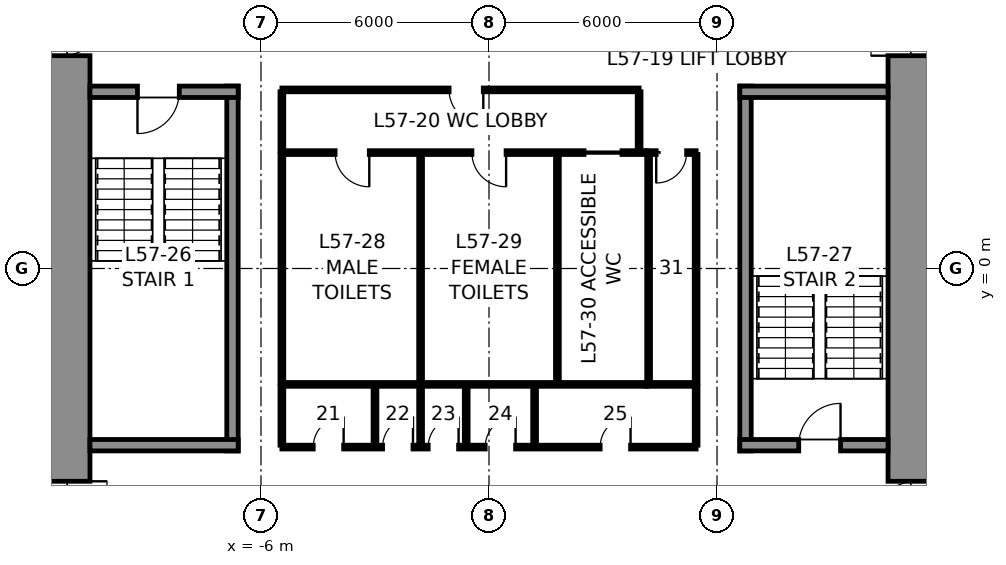
"""IFC4 building model, lengths in metres.
Left out: names, types, materials, properties, quantities, classifications, styles, units other than length and angle.
Written with IfcOpenShell. Run it as: python <this file> out.ifc"""

import sys

from ifc_helpers import new_model, si_unit, direction, frame, frame_2d, origin, place, context, subcontext, project, spatial, rectangle, extrude, element, fill, save


model = new_model("IFC4")
c1 = context("Model", 3, precision=1e-05, world=origin(), true_north=direction((0.0, 1.0)))
c2 = subcontext(c1, "Body", "Model", "MODEL_VIEW")
j1 = project(units=[si_unit("LENGTHUNIT", "METRE"), si_unit("PLANEANGLEUNIT", "RADIAN")], contexts=[c1])
p1 = place(None, origin())
s1 = spatial("IfcSite", under=j1, at=p1, CompositionType="ELEMENT")
p2 = place(p1, origin())
s2 = spatial("IfcBuilding", under=s1, at=p2, CompositionType="ELEMENT")
p3 = place(p2, frame((0.0, 0.0, 257.8)))
s3 = spatial("IfcBuildingStorey", under=s2, at=p3, CompositionType="ELEMENT", Elevation=257.8)
p4 = place(p3, frame((11.25, 10.5, 0.0), z_axis=(0.0, 0.0, 1.0), x_axis=(0.0, -1.0, 0.0)))
e1 = element("IfcWall", 1, at=p4, inside=s3, PredefinedType="SHEAR", context=c2, shape_type="SweptSolid", body=[
    extrude(rectangle(XDim=21.0, YDim=1.5, at=frame_2d((10.5, 0.0))), origin(), (0.0, 0.0, 1.0), 4.0),
])
p5 = place(p4, frame((3.7, 0.0, 0.0)))
e2 = element("IfcOpeningElement", 2, at=p5, cuts=e1, PredefinedType="OPENING", context=c2, shape_type="SweptSolid", body=[
    extrude(rectangle(XDim=1.2, YDim=2.3, at=frame_2d((0.6, 1.15))), frame((0.0, 0.76, 0.0), z_axis=(0.0, -1.0, 0.0), x_axis=(1.0, 0.0, 0.0)), (0.0, 0.0, 1.0), 1.52),
])
p6 = place(p4, frame((16.1, 0.0, 0.0)))
e3 = element("IfcOpeningElement", 3, at=p6, cuts=e1, PredefinedType="OPENING", context=c2, shape_type="SweptSolid", body=[
    extrude(rectangle(XDim=1.2, YDim=2.3, at=frame_2d((0.6, 1.15))), frame((0.0, 0.76, 0.0), z_axis=(0.0, -1.0, 0.0), x_axis=(1.0, 0.0, 0.0)), (0.0, 0.0, 1.0), 1.52),
])
p7 = place(p3, frame((-11.25, -10.5, 0.0), z_axis=(0.0, 0.0, 1.0), x_axis=(0.0, 1.0, 0.0)))
e4 = element("IfcWall", 4, at=p7, inside=s3, PredefinedType="SHEAR", context=c2, shape_type="SweptSolid", body=[
    extrude(rectangle(XDim=21.0, YDim=1.5, at=frame_2d((10.5, 0.0))), origin(), (0.0, 0.0, 1.0), 4.0),
])
p8 = place(p7, frame((16.1, 0.0, 0.0)))
e5 = element("IfcOpeningElement", 5, at=p8, cuts=e4, PredefinedType="OPENING", context=c2, shape_type="SweptSolid", body=[
    extrude(rectangle(XDim=1.2, YDim=2.3, at=frame_2d((0.6, 1.15))), frame((0.0, 0.76, 0.0), z_axis=(0.0, -1.0, 0.0), x_axis=(1.0, 0.0, 0.0)), (0.0, 0.0, 1.0), 1.52),
])
p9 = place(p7, frame((3.7, 0.0, 0.0)))
e6 = element("IfcOpeningElement", 6, at=p9, cuts=e4, PredefinedType="OPENING", context=c2, shape_type="SweptSolid", body=[
    extrude(rectangle(XDim=1.2, YDim=2.3, at=frame_2d((0.6, 1.15))), frame((0.0, 0.76, 0.0), z_axis=(0.0, -1.0, 0.0), x_axis=(1.0, 0.0, 0.0)), (0.0, 0.0, 1.0), 1.52),
])
p10 = place(p3, frame((-6.75, -4.8, 0.0), z_axis=(0.0, 0.0, 1.0), x_axis=(0.0, 1.0, 0.0)))
e7 = element("IfcWall", 7, at=p10, inside=s3, PredefinedType="SOLIDWALL", context=c2, shape_type="SweptSolid", body=[
    extrude(rectangle(XDim=9.6, YDim=0.3, at=frame_2d((4.8, 0.0))), origin(), (0.0, 0.0, 1.0), 3.75),
])
p11 = place(p3, frame((-10.5, 4.65, 0.0), z_axis=(0.0, 0.0, 1.0), x_axis=(1.0, 0.0, 0.0)))
e8 = element("IfcWall", 8, at=p11, inside=s3, PredefinedType="SOLIDWALL", context=c2, shape_type="SweptSolid", body=[
    extrude(rectangle(XDim=3.9, YDim=0.3, at=frame_2d((1.95, 0.0))), origin(), (0.0, 0.0, 1.0), 3.75),
])
p12 = place(p11, frame((1.25, 0.0, 0.0)))
e9 = element("IfcOpeningElement", 9, at=p12, cuts=e8, PredefinedType="OPENING", context=c2, shape_type="SweptSolid", body=[
    extrude(rectangle(XDim=1.1, YDim=2.3, at=frame_2d((0.55, 1.15))), frame((0.0, 0.16, 0.0), z_axis=(0.0, -1.0, 0.0), x_axis=(1.0, 0.0, 0.0)), (0.0, 0.0, 1.0), 0.32),
])
p13 = place(p3, frame((-6.6, -4.65, 0.0), z_axis=(0.0, 0.0, 1.0), x_axis=(-1.0, 0.0, 0.0)))
e10 = element("IfcWall", 10, at=p13, inside=s3, PredefinedType="SOLIDWALL", context=c2, shape_type="SweptSolid", body=[
    extrude(rectangle(XDim=3.9, YDim=0.3, at=frame_2d((1.95, 0.0))), origin(), (0.0, 0.0, 1.0), 3.75),
])
p14 = place(p3, frame((6.75, -4.8, 0.0), z_axis=(0.0, 0.0, 1.0), x_axis=(0.0, 1.0, 0.0)))
e11 = element("IfcWall", 11, at=p14, inside=s3, PredefinedType="SOLIDWALL", context=c2, shape_type="SweptSolid", body=[
    extrude(rectangle(XDim=9.6, YDim=0.3, at=frame_2d((4.8, 0.0))), origin(), (0.0, 0.0, 1.0), 3.75),
])
p15 = place(p3, frame((6.6, 4.65, 0.0), z_axis=(0.0, 0.0, 1.0), x_axis=(1.0, 0.0, 0.0)))
e12 = element("IfcWall", 12, at=p15, inside=s3, PredefinedType="SOLIDWALL", context=c2, shape_type="SweptSolid", body=[
    extrude(rectangle(XDim=3.9, YDim=0.3, at=frame_2d((1.95, 0.0))), origin(), (0.0, 0.0, 1.0), 3.75),
])
p16 = place(p3, frame((10.5, -4.65, 0.0), z_axis=(0.0, 0.0, 1.0), x_axis=(-1.0, 0.0, 0.0)))
e13 = element("IfcWall", 13, at=p16, inside=s3, PredefinedType="SOLIDWALL", context=c2, shape_type="SweptSolid", body=[
    extrude(rectangle(XDim=3.9, YDim=0.3, at=frame_2d((1.95, 0.0))), origin(), (0.0, 0.0, 1.0), 3.75),
])
p17 = place(p16, frame((1.25, 0.0, 0.0)))
e14 = element("IfcOpeningElement", 14, at=p17, cuts=e13, PredefinedType="OPENING", context=c2, shape_type="SweptSolid", body=[
    extrude(rectangle(XDim=1.1, YDim=2.3, at=frame_2d((0.55, 1.15))), frame((0.0, 0.16, 0.0), z_axis=(0.0, -1.0, 0.0), x_axis=(1.0, 0.0, 0.0)), (0.0, 0.0, 1.0), 0.32),
])
p18 = place(p3, frame((-5.45, 3.05, 0.0), z_axis=(0.0, 0.0, 1.0), x_axis=(1.0, 0.0, 0.0)))
e15 = element("IfcWall", 15, at=p18, inside=s3, PredefinedType="PARTITIONING", context=c2, shape_type="SweptSolid", body=[
    extrude(rectangle(XDim=9.6, YDim=0.1, at=frame_2d((4.8, 0.0))), origin(), (0.0, 0.0, 1.0), 3.75),
])
p19 = place(p18, frame((1.4, 0.0, 0.0)))
e16 = element("IfcOpeningElement", 16, at=p19, cuts=e15, PredefinedType="OPENING", context=c2, shape_type="SweptSolid", body=[
    extrude(rectangle(XDim=0.9, YDim=2.3, at=frame_2d((0.45, 1.15))), frame((0.0, 0.06, 0.0), z_axis=(0.0, -1.0, 0.0), x_axis=(1.0, 0.0, 0.0)), (0.0, 0.0, 1.0), 0.12),
])
p20 = place(p18, frame((5.0, 0.0, 0.0)))
e17 = element("IfcOpeningElement", 17, at=p20, cuts=e15, PredefinedType="OPENING", context=c2, shape_type="SweptSolid", body=[
    extrude(rectangle(XDim=0.9, YDim=2.3, at=frame_2d((0.45, 1.15))), frame((0.0, 0.06, 0.0), z_axis=(0.0, -1.0, 0.0), x_axis=(1.0, 0.0, 0.0)), (0.0, 0.0, 1.0), 0.12),
])
p21 = place(p18, frame((7.95, 0.0, 0.0)))
e18 = element("IfcOpeningElement", 18, at=p21, cuts=e15, PredefinedType="OPENING", context=c2, shape_type="SweptSolid", body=[
    extrude(rectangle(XDim=1.0, YDim=2.3, at=frame_2d((0.5, 1.15))), frame((0.0, 0.06, 0.0), z_axis=(0.0, -1.0, 0.0), x_axis=(1.0, 0.0, 0.0)), (0.0, 0.0, 1.0), 0.12),
])
p22 = place(p3, frame((4.15, 3.05, 0.0), z_axis=(0.0, 0.0, 1.0), x_axis=(1.0, 0.0, 0.0)))
e19 = element("IfcWall", 19, at=p22, inside=s3, PredefinedType="PARTITIONING", context=c2, shape_type="SweptSolid", body=[
    extrude(rectangle(XDim=1.3, YDim=0.1, at=frame_2d((0.65, 0.0))), origin(), (0.0, 0.0, 1.0), 3.75),
])
p23 = place(p22, frame((0.25, 0.0, 0.0)))
e20 = element("IfcOpeningElement", 20, at=p23, cuts=e19, PredefinedType="OPENING", context=c2, shape_type="SweptSolid", body=[
    extrude(rectangle(XDim=0.8, YDim=2.3, at=frame_2d((0.4, 1.15))), frame((0.0, 0.06, 0.0), z_axis=(0.0, -1.0, 0.0), x_axis=(1.0, 0.0, 0.0)), (0.0, 0.0, 1.0), 0.12),
])
p24 = place(p3, frame((4.15, -3.05, 0.0), z_axis=(0.0, 0.0, 1.0), x_axis=(-1.0, 0.0, 0.0)))
e21 = element("IfcWall", 21, at=p24, inside=s3, PredefinedType="PARTITIONING", context=c2, shape_type="SweptSolid", body=[
    extrude(rectangle(XDim=9.6, YDim=0.1, at=frame_2d((4.8, 0.0))), origin(), (0.0, 0.0, 1.0), 3.75),
])
p25 = place(p3, frame((5.45, -3.05, 0.0), z_axis=(0.0, 0.0, 1.0), x_axis=(-1.0, 0.0, 0.0)))
e22 = element("IfcWall", 22, at=p25, inside=s3, PredefinedType="PARTITIONING", context=c2, shape_type="SweptSolid", body=[
    extrude(rectangle(XDim=1.3, YDim=0.1, at=frame_2d((0.65, 0.0))), origin(), (0.0, 0.0, 1.0), 3.75),
])
for number, where, z_axis, x_axis in (
    (23, (5.45, 3.0, 0.0), (0.0, 0.0, 1.0), (0.0, -1.0, 0.0)),
    (24, (-5.45, -3.0, 0.0), (0.0, 0.0, 1.0), (0.0, 1.0, 0.0)),
    (25, (-1.8, -3.0, 0.0), (0.0, 0.0, 1.0), (0.0, 1.0, 0.0)),
    (26, (1.8, -3.0, 0.0), (0.0, 0.0, 1.0), (0.0, 1.0, 0.0)),
    (27, (4.2, -3.0, 0.0), (0.0, 0.0, 1.0), (0.0, 1.0, 0.0)),
):
    element("IfcWall", number, at=place(p3, frame(where, z_axis=z_axis, x_axis=x_axis)), inside=s3, PredefinedType="PARTITIONING", context=c2, shape_type="SweptSolid", body=[
        extrude(rectangle(XDim=6.0, YDim=0.1, at=frame_2d((3.0, 0.0))), origin(), (0.0, 0.0, 1.0), 3.75),
    ])
p26 = place(p3, frame((-5.45, 4.7, 0.0), z_axis=(0.0, 0.0, 1.0), x_axis=(1.0, 0.0, 0.0)))
e28 = element("IfcWall", 28, at=p26, inside=s3, PredefinedType="PARTITIONING", context=c2, shape_type="SweptSolid", body=[
    extrude(rectangle(XDim=9.4, YDim=0.1, at=frame_2d((4.7, 0.0))), origin(), (0.0, 0.0, 1.0), 3.75),
])
p27 = place(p26, frame((4.4, 0.0, 0.0)))
e29 = element("IfcOpeningElement", 29, at=p27, cuts=e28, PredefinedType="OPENING", context=c2, shape_type="SweptSolid", body=[
    extrude(rectangle(XDim=0.9, YDim=2.3, at=frame_2d((0.45, 1.15))), frame((0.0, 0.06, 0.0), z_axis=(0.0, -1.0, 0.0), x_axis=(1.0, 0.0, 0.0)), (0.0, 0.0, 1.0), 0.12),
])
for number, where, z_axis, x_axis in (
    (30, (-5.45, 3.1, 0.0), (0.0, 0.0, 1.0), (0.0, 1.0, 0.0)),
    (31, (3.95, 3.1, 0.0), (0.0, 0.0, 1.0), (0.0, 1.0, 0.0)),
):
    element("IfcWall", number, at=place(p3, frame(where, z_axis=z_axis, x_axis=x_axis)), inside=s3, PredefinedType="PARTITIONING", context=c2, shape_type="SweptSolid", body=[
        extrude(rectangle(XDim=1.55, YDim=0.1, at=frame_2d((0.775, 0.0))), origin(), (0.0, 0.0, 1.0), 3.75),
    ])
p28 = place(p3, frame((5.45, -4.7, 0.0), z_axis=(0.0, 0.0, 1.0), x_axis=(-1.0, 0.0, 0.0)))
e32 = element("IfcWall", 32, at=p28, inside=s3, PredefinedType="PARTITIONING", context=c2, shape_type="SweptSolid", body=[
    extrude(rectangle(XDim=10.9, YDim=0.1, at=frame_2d((5.45, 0.0))), origin(), (0.0, 0.0, 1.0), 3.75),
])
p29 = place(p28, frame((9.275, 0.0, 0.0)))
e33 = element("IfcOpeningElement", 33, at=p29, cuts=e32, PredefinedType="OPENING", context=c2, shape_type="SweptSolid", body=[
    extrude(rectangle(XDim=0.8, YDim=2.3, at=frame_2d((0.4, 1.15))), frame((0.0, 0.06, 0.0), z_axis=(0.0, -1.0, 0.0), x_axis=(1.0, 0.0, 0.0)), (0.0, 0.0, 1.0), 0.12),
])
p30 = place(p28, frame((7.45, 0.0, 0.0)))
e34 = element("IfcOpeningElement", 34, at=p30, cuts=e32, PredefinedType="OPENING", context=c2, shape_type="SweptSolid", body=[
    extrude(rectangle(XDim=0.8, YDim=2.3, at=frame_2d((0.4, 1.15))), frame((0.0, 0.06, 0.0), z_axis=(0.0, -1.0, 0.0), x_axis=(1.0, 0.0, 0.0)), (0.0, 0.0, 1.0), 0.12),
])
p31 = place(p28, frame((6.25, 0.0, 0.0)))
e35 = element("IfcOpeningElement", 35, at=p31, cuts=e32, PredefinedType="OPENING", context=c2, shape_type="SweptSolid", body=[
    extrude(rectangle(XDim=0.8, YDim=2.3, at=frame_2d((0.4, 1.15))), frame((0.0, 0.06, 0.0), z_axis=(0.0, -1.0, 0.0), x_axis=(1.0, 0.0, 0.0)), (0.0, 0.0, 1.0), 0.12),
])
p32 = place(p28, frame((4.75, 0.0, 0.0)))
e36 = element("IfcOpeningElement", 36, at=p32, cuts=e32, PredefinedType="OPENING", context=c2, shape_type="SweptSolid", body=[
    extrude(rectangle(XDim=0.8, YDim=2.3, at=frame_2d((0.4, 1.15))), frame((0.0, 0.06, 0.0), z_axis=(0.0, -1.0, 0.0), x_axis=(1.0, 0.0, 0.0)), (0.0, 0.0, 1.0), 0.12),
])
p33 = place(p28, frame((1.725, 0.0, 0.0)))
e37 = element("IfcOpeningElement", 37, at=p33, cuts=e32, PredefinedType="OPENING", context=c2, shape_type="SweptSolid", body=[
    extrude(rectangle(XDim=0.8, YDim=2.3, at=frame_2d((0.4, 1.15))), frame((0.0, 0.06, 0.0), z_axis=(0.0, -1.0, 0.0), x_axis=(1.0, 0.0, 0.0)), (0.0, 0.0, 1.0), 0.12),
])
for number, where, z_axis, x_axis in (
    (38, (-5.45, -3.1, 0.0), (0.0, 0.0, 1.0), (0.0, -1.0, 0.0)),
    (39, (5.45, -3.1, 0.0), (0.0, 0.0, 1.0), (0.0, -1.0, 0.0)),
    (40, (-3.0, -3.1, 0.0), (0.0, 0.0, 1.0), (0.0, -1.0, 0.0)),
    (41, (-1.8, -3.1, 0.0), (0.0, 0.0, 1.0), (0.0, -1.0, 0.0)),
    (42, (-0.6, -3.1, 0.0), (0.0, 0.0, 1.0), (0.0, -1.0, 0.0)),
    (43, (1.2, -3.1, 0.0), (0.0, 0.0, 1.0), (0.0, -1.0, 0.0)),
):
    element("IfcWall", number, at=place(p3, frame(where, z_axis=z_axis, x_axis=x_axis)), inside=s3, PredefinedType="PARTITIONING", context=c2, shape_type="SweptSolid", body=[
        extrude(rectangle(XDim=1.55, YDim=0.1, at=frame_2d((0.775, 0.0))), origin(), (0.0, 0.0, 1.0), 3.75),
    ])
p34 = place(p12, frame((1.1, 0.0, 0.0), z_axis=(0.0, 0.0, 1.0), x_axis=(-1.0, 0.0, 0.0)))
e44 = element("IfcDoor", 44, at=p34, inside=s3, OperationType="SINGLE_SWING_RIGHT", PredefinedType="DOOR", context=c2, shape_type="SweptSolid", body=[
    extrude(rectangle(XDim=1.1, YDim=2.3, at=frame_2d((0.55, 1.15))), frame((0.0, 0.025, 0.0), z_axis=(0.0, -1.0, 0.0), x_axis=(1.0, 0.0, 0.0)), (0.0, 0.0, 1.0), 0.05),
])
fill(e9, e44)
p35 = place(p17, frame((1.1, 0.0, 0.0), z_axis=(0.0, 0.0, 1.0), x_axis=(-1.0, 0.0, 0.0)))
e45 = element("IfcDoor", 45, at=p35, inside=s3, OperationType="SINGLE_SWING_RIGHT", PredefinedType="DOOR", context=c2, shape_type="SweptSolid", body=[
    extrude(rectangle(XDim=1.1, YDim=2.3, at=frame_2d((0.55, 1.15))), frame((0.0, 0.025, 0.0), z_axis=(0.0, -1.0, 0.0), x_axis=(1.0, 0.0, 0.0)), (0.0, 0.0, 1.0), 0.05),
])
fill(e14, e45)
p36 = place(p19, frame((0.9, 0.0, 0.0), z_axis=(0.0, 0.0, 1.0), x_axis=(-1.0, 0.0, 0.0)))
e46 = element("IfcDoor", 46, at=p36, inside=s3, OperationType="SINGLE_SWING_LEFT", PredefinedType="DOOR", context=c2, shape_type="SweptSolid", body=[
    extrude(rectangle(XDim=0.9, YDim=2.3, at=frame_2d((0.45, 1.15))), frame((0.0, 0.025, 0.0), z_axis=(0.0, -1.0, 0.0), x_axis=(1.0, 0.0, 0.0)), (0.0, 0.0, 1.0), 0.05),
])
fill(e16, e46)
p37 = place(p20, frame((0.9, 0.0, 0.0), z_axis=(0.0, 0.0, 1.0), x_axis=(-1.0, 0.0, 0.0)))
e47 = element("IfcDoor", 47, at=p37, inside=s3, OperationType="SINGLE_SWING_LEFT", PredefinedType="DOOR", context=c2, shape_type="SweptSolid", body=[
    extrude(rectangle(XDim=0.9, YDim=2.3, at=frame_2d((0.45, 1.15))), frame((0.0, 0.025, 0.0), z_axis=(0.0, -1.0, 0.0), x_axis=(1.0, 0.0, 0.0)), (0.0, 0.0, 1.0), 0.05),
])
fill(e17, e47)
p38 = place(p21, frame((1.0, 0.0, 0.0), z_axis=(0.0, 0.0, 1.0), x_axis=(-1.0, 0.0, 0.0)))
e48 = element("IfcDoor", 48, at=p38, inside=s3, OperationType="SLIDING_TO_LEFT", PredefinedType="DOOR", context=c2, shape_type="SweptSolid", body=[
    extrude(rectangle(XDim=1.0, YDim=2.3, at=frame_2d((0.5, 1.15))), frame((0.0, 0.025, 0.0), z_axis=(0.0, -1.0, 0.0), x_axis=(1.0, 0.0, 0.0)), (0.0, 0.0, 1.0), 0.05),
])
fill(e18, e48)
p39 = place(p23, frame((0.8, 0.0, 0.0), z_axis=(0.0, 0.0, 1.0), x_axis=(-1.0, 0.0, 0.0)))
e49 = element("IfcDoor", 49, at=p39, inside=s3, OperationType="SINGLE_SWING_RIGHT", PredefinedType="DOOR", context=c2, shape_type="SweptSolid", body=[
    extrude(rectangle(XDim=0.8, YDim=2.3, at=frame_2d((0.4, 1.15))), frame((0.0, 0.025, 0.0), z_axis=(0.0, -1.0, 0.0), x_axis=(1.0, 0.0, 0.0)), (0.0, 0.0, 1.0), 0.05),
])
fill(e20, e49)
p40 = place(p27, frame((0.9, 0.0, 0.0), z_axis=(0.0, 0.0, 1.0), x_axis=(-1.0, 0.0, 0.0)))
e50 = element("IfcDoor", 50, at=p40, inside=s3, OperationType="SINGLE_SWING_LEFT", PredefinedType="DOOR", context=c2, shape_type="SweptSolid", body=[
    extrude(rectangle(XDim=0.9, YDim=2.3, at=frame_2d((0.45, 1.15))), frame((0.0, 0.025, 0.0), z_axis=(0.0, -1.0, 0.0), x_axis=(1.0, 0.0, 0.0)), (0.0, 0.0, 1.0), 0.05),
])
fill(e29, e50)
p41 = place(p29, frame((0.8, 0.0, 0.0), z_axis=(0.0, 0.0, 1.0), x_axis=(-1.0, 0.0, 0.0)))
e51 = element("IfcDoor", 51, at=p41, inside=s3, OperationType="SINGLE_SWING_RIGHT", PredefinedType="DOOR", context=c2, shape_type="SweptSolid", body=[
    extrude(rectangle(XDim=0.8, YDim=2.3, at=frame_2d((0.4, 1.15))), frame((0.0, 0.025, 0.0), z_axis=(0.0, -1.0, 0.0), x_axis=(1.0, 0.0, 0.0)), (0.0, 0.0, 1.0), 0.05),
])
fill(e33, e51)
p42 = place(p30, frame((0.8, 0.0, 0.0), z_axis=(0.0, 0.0, 1.0), x_axis=(-1.0, 0.0, 0.0)))
e52 = element("IfcDoor", 52, at=p42, inside=s3, OperationType="SINGLE_SWING_RIGHT", PredefinedType="DOOR", context=c2, shape_type="SweptSolid", body=[
    extrude(rectangle(XDim=0.8, YDim=2.3, at=frame_2d((0.4, 1.15))), frame((0.0, 0.025, 0.0), z_axis=(0.0, -1.0, 0.0), x_axis=(1.0, 0.0, 0.0)), (0.0, 0.0, 1.0), 0.05),
])
fill(e34, e52)
p43 = place(p31, frame((0.8, 0.0, 0.0), z_axis=(0.0, 0.0, 1.0), x_axis=(-1.0, 0.0, 0.0)))
e53 = element("IfcDoor", 53, at=p43, inside=s3, OperationType="SINGLE_SWING_RIGHT", PredefinedType="DOOR", context=c2, shape_type="SweptSolid", body=[
    extrude(rectangle(XDim=0.8, YDim=2.3, at=frame_2d((0.4, 1.15))), frame((0.0, 0.025, 0.0), z_axis=(0.0, -1.0, 0.0), x_axis=(1.0, 0.0, 0.0)), (0.0, 0.0, 1.0), 0.05),
])
fill(e35, e53)
p44 = place(p32, frame((0.8, 0.0, 0.0), z_axis=(0.0, 0.0, 1.0), x_axis=(-1.0, 0.0, 0.0)))
e54 = element("IfcDoor", 54, at=p44, inside=s3, OperationType="SINGLE_SWING_RIGHT", PredefinedType="DOOR", context=c2, shape_type="SweptSolid", body=[
    extrude(rectangle(XDim=0.8, YDim=2.3, at=frame_2d((0.4, 1.15))), frame((0.0, 0.025, 0.0), z_axis=(0.0, -1.0, 0.0), x_axis=(1.0, 0.0, 0.0)), (0.0, 0.0, 1.0), 0.05),
])
fill(e36, e54)
p45 = place(p33, frame((0.8, 0.0, 0.0), z_axis=(0.0, 0.0, 1.0), x_axis=(-1.0, 0.0, 0.0)))
e55 = element("IfcDoor", 55, at=p45, inside=s3, OperationType="SINGLE_SWING_RIGHT", PredefinedType="DOOR", context=c2, shape_type="SweptSolid", body=[
    extrude(rectangle(XDim=0.8, YDim=2.3, at=frame_2d((0.4, 1.15))), frame((0.0, 0.025, 0.0), z_axis=(0.0, -1.0, 0.0), x_axis=(1.0, 0.0, 0.0)), (0.0, 0.0, 1.0), 0.05),
])
fill(e37, e55)
p46 = place(p8, frame((1.2, 0.0, 0.0), z_axis=(0.0, 0.0, 1.0), x_axis=(-1.0, 0.0, 0.0)))
e56 = element("IfcDoor", 56, at=p46, inside=s3, OperationType="SINGLE_SWING_LEFT", PredefinedType="DOOR", context=c2, shape_type="SweptSolid", body=[
    extrude(rectangle(XDim=1.2, YDim=2.3, at=frame_2d((0.6, 1.15))), frame((0.0, 0.025, 0.0), z_axis=(0.0, -1.0, 0.0), x_axis=(1.0, 0.0, 0.0)), (0.0, 0.0, 1.0), 0.05),
])
fill(e5, e56)
p47 = place(p9, frame((1.2, 0.0, 0.0), z_axis=(0.0, 0.0, 1.0), x_axis=(-1.0, 0.0, 0.0)))
e57 = element("IfcDoor", 57, at=p47, inside=s3, OperationType="SINGLE_SWING_LEFT", PredefinedType="DOOR", context=c2, shape_type="SweptSolid", body=[
    extrude(rectangle(XDim=1.2, YDim=2.3, at=frame_2d((0.6, 1.15))), frame((0.0, 0.025, 0.0), z_axis=(0.0, -1.0, 0.0), x_axis=(1.0, 0.0, 0.0)), (0.0, 0.0, 1.0), 0.05),
])
fill(e6, e57)
p48 = place(p5, frame((1.2, 0.0, 0.0), z_axis=(0.0, 0.0, 1.0), x_axis=(-1.0, 0.0, 0.0)))
e58 = element("IfcDoor", 58, at=p48, inside=s3, OperationType="SINGLE_SWING_LEFT", PredefinedType="DOOR", context=c2, shape_type="SweptSolid", body=[
    extrude(rectangle(XDim=1.2, YDim=2.3, at=frame_2d((0.6, 1.15))), frame((0.0, 0.025, 0.0), z_axis=(0.0, -1.0, 0.0), x_axis=(1.0, 0.0, 0.0)), (0.0, 0.0, 1.0), 0.05),
])
fill(e2, e58)
p49 = place(p6, frame((1.2, 0.0, 0.0), z_axis=(0.0, 0.0, 1.0), x_axis=(-1.0, 0.0, 0.0)))
e59 = element("IfcDoor", 59, at=p49, inside=s3, OperationType="SINGLE_SWING_LEFT", PredefinedType="DOOR", context=c2, shape_type="SweptSolid", body=[
    extrude(rectangle(XDim=1.2, YDim=2.3, at=frame_2d((0.6, 1.15))), frame((0.0, 0.025, 0.0), z_axis=(0.0, -1.0, 0.0), x_axis=(1.0, 0.0, 0.0)), (0.0, 0.0, 1.0), 0.05),
])
fill(e3, e59)
save(model, sys.argv[1])
